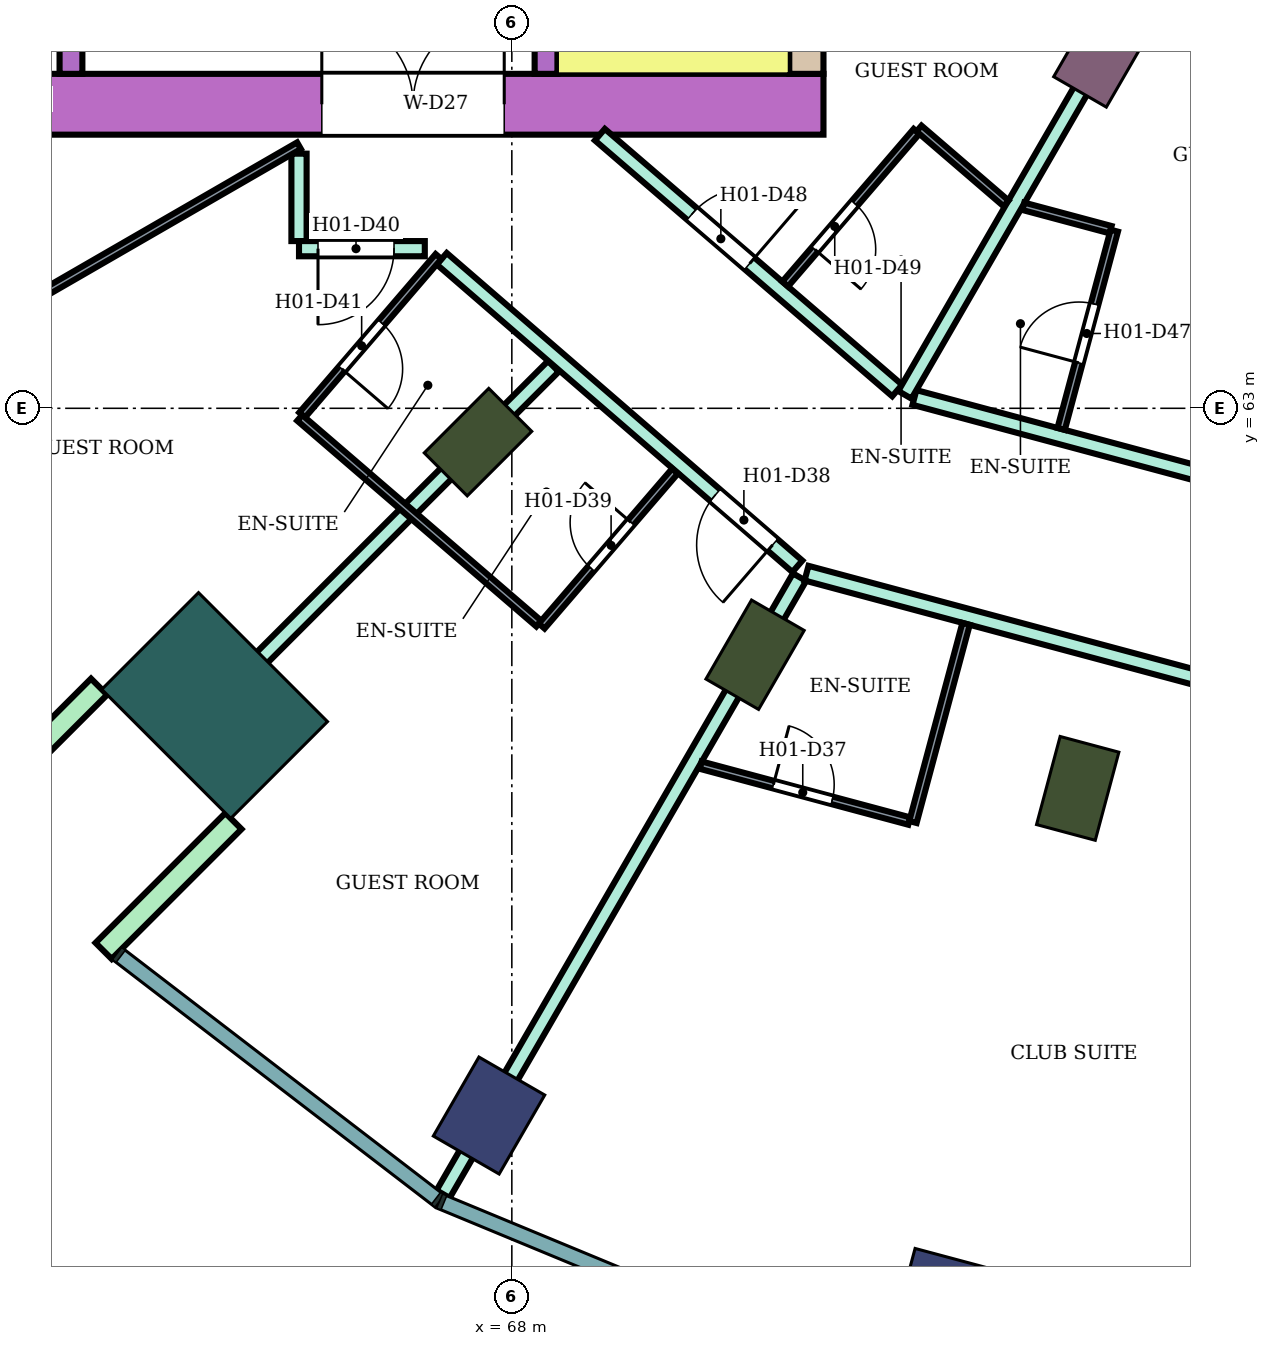
"""IFC4 building model, lengths in metres.
Left out: names, types, materials, properties, quantities, classifications, styles, units other than length and angle.
Written with IfcOpenShell. Run it as: python <this file> out.ifc"""

import sys

from ifc_helpers import new_model, si_unit, direction, frame, frame_2d, origin, origin_2d, place, context, subcontext, project, spatial, rectangle, extrude, element, fill, save


model = new_model("IFC4")
c1 = context("Model", 3, precision=1e-05, world=origin(), true_north=direction((0.0, 1.0)))
c2 = subcontext(c1, "Body", "Model", "MODEL_VIEW")
j1 = project(units=[si_unit("LENGTHUNIT", "METRE"), si_unit("PLANEANGLEUNIT", "RADIAN")], contexts=[c1])
p1 = place(None, origin())
s1 = spatial("IfcSite", under=j1, at=p1, CompositionType="ELEMENT")
p2 = place(p1, origin())
s2 = spatial("IfcBuilding", under=s1, at=p2, CompositionType="ELEMENT")
p3 = place(p2, frame((0.0, 0.0, 36.4)))
s3 = spatial("IfcBuildingStorey", under=s2, at=p3, CompositionType="ELEMENT", Elevation=36.4)
for number, where, z_axis, x_axis in (
    (1, (67.7, 53.696, 0.0), (0.0, 0.0, 1.0), (-0.5, -0.866, 0.0)),
    (2, (73.633, 51.238, 0.0), (0.0, 0.0, 1.0), (-0.259, -0.966, 0.0)),
):
    element("IfcColumn", number, at=place(p3, frame(where, z_axis=z_axis, x_axis=x_axis)), inside=s3, PredefinedType="COLUMN", context=c2, shape_type="SweptSolid", body=[
        extrude(rectangle(XDim=1.2, YDim=1.0, at=origin_2d()), origin(), (0.0, 0.0, 1.0), 3.8),
    ])
for number, where, z_axis, x_axis in (
    (3, (67.555, 62.555, 0.0), (0.0, 0.0, 1.0), (-0.707, -0.707, 0.0)),
    (4, (71.2, 59.758, 0.0), (0.0, 0.0, 1.0), (-0.5, -0.866, 0.0)),
    (5, (75.445, 58.0, 0.0), (0.0, 0.0, 1.0), (-0.259, -0.966, 0.0)),
):
    element("IfcColumn", number, at=place(p3, frame(where, z_axis=z_axis, x_axis=x_axis)), inside=s3, PredefinedType="COLUMN", context=c2, shape_type="SweptSolid", body=[
        extrude(rectangle(XDim=1.2, YDim=0.8, at=origin_2d()), origin(), (0.0, 0.0, 1.0), 3.8),
    ])
p4 = place(p3, frame((75.7, 67.552, 0.0), z_axis=(0.0, 0.0, 1.0), x_axis=(-0.5, -0.866025403784, 0.0)))
e6 = element("IfcColumn", 6, at=p4, inside=s3, PredefinedType="COLUMN", context=c2, shape_type="SweptSolid", body=[
    extrude(rectangle(XDim=0.9, YDim=0.8, at=origin_2d()), origin(), (0.0, 0.0, 1.0), 3.8),
])
p5 = place(p3, frame((64.09, 59.09, 0.0), z_axis=(0.0, 0.0, 1.0), x_axis=(-0.707106781187, -0.707106781187, 0.0)))
e7 = element("IfcColumn", 7, at=p5, inside=s3, PredefinedType="COLUMN", context=c2, shape_type="SweptSolid", body=[
    extrude(rectangle(XDim=1.8, YDim=2.4, at=origin_2d()), origin(), (0.0, 0.0, 1.0), 3.8),
])
p6 = place(p3, frame((72.1, 67.0, 0.0), z_axis=(0.0, 0.0, 1.0), x_axis=(-1.0, 0.0, 0.0)))
e8 = element("IfcWall", 8, at=p6, inside=s3, PredefinedType="SHEAR", context=c2, shape_type="SweptSolid", body=[
    extrude(rectangle(XDim=14.7, YDim=0.8, at=frame_2d((7.35, 0.0))), origin(), (0.0, 0.0, 1.0), 3.48),
])
p7 = place(p6, frame((4.2, 0.0, 0.0)))
e9 = element("IfcOpeningElement", 9, at=p7, cuts=e8, PredefinedType="OPENING", context=c2, shape_type="SweptSolid", body=[
    extrude(rectangle(XDim=2.4, YDim=2.4, at=frame_2d((1.2, 1.2))), frame((0.0, 0.41, 0.0), z_axis=(0.0, -1.0, 0.0), x_axis=(1.0, 0.0, 0.0)), (0.0, 0.0, 1.0), 0.82),
])
p8 = place(p3, frame((71.875, 75.0, 0.0), z_axis=(0.0, 0.0, 1.0), x_axis=(0.0, -1.0, 0.0)))
e10 = element("IfcWall", 10, at=p8, inside=s3, PredefinedType="SHEAR", context=c2, shape_type="SweptSolid", body=[
    extrude(rectangle(XDim=7.6, YDim=0.45, at=frame_2d((3.8, 0.0))), origin(), (0.0, 0.0, 1.0), 3.48),
])
p9 = place(p3, frame((68.45, 75.0, 0.0), z_axis=(0.0, 0.0, 1.0), x_axis=(0.0, -1.0, 0.0)))
e11 = element("IfcWall", 11, at=p9, inside=s3, PredefinedType="SHEAR", context=c2, shape_type="SweptSolid", body=[
    extrude(rectangle(XDim=7.6, YDim=0.3, at=frame_2d((3.8, 0.0))), origin(), (0.0, 0.0, 1.0), 3.48),
])
p10 = place(p9, frame((1.85, 0.0, 0.0)))
e12 = element("IfcOpeningElement", 12, at=p10, cuts=e11, PredefinedType="OPENING", context=c2, shape_type="SweptSolid", body=[
    extrude(rectangle(XDim=0.9, YDim=2.1, at=frame_2d((0.45, 1.05))), frame((0.0, 0.16, 0.0), z_axis=(0.0, -1.0, 0.0), x_axis=(1.0, 0.0, 0.0)), (0.0, 0.0, 1.0), 0.32),
])
p11 = place(p3, frame((62.2, 71.4, 0.0), z_axis=(0.0, 0.0, 1.0), x_axis=(0.0, -1.0, 0.0)))
e13 = element("IfcWall", 13, at=p11, inside=s3, PredefinedType="SHEAR", context=c2, shape_type="SweptSolid", body=[
    extrude(rectangle(XDim=4.0, YDim=0.3, at=frame_2d((2.0, 0.0))), origin(), (0.0, 0.0, 1.0), 3.48),
])
for number, where, z_axis, x_axis in (
    (14, (62.57, 59.338, 0.0), (0.0, 0.0, 1.0), (-0.707, -0.707, 0.0)),
    (15, (64.338, 57.57, 0.0), (0.0, 0.0, 1.0), (-0.707, -0.707, 0.0)),
):
    element("IfcWall", number, at=place(p3, frame(where, z_axis=z_axis, x_axis=x_axis)), inside=s3, PredefinedType="NOTDEFINED", context=c2, shape_type="SweptSolid", body=[
        extrude(rectangle(XDim=2.416, YDim=0.3, at=frame_2d((1.208, 0.0))), origin(), (0.0, 0.0, 1.0), 3.8),
    ])
p12 = place(p3, frame((76.198, 68.415, 0.0), z_axis=(0.0, 0.0, 1.0), x_axis=(0.965933654434, -0.258789828301, 0.0)))
e16 = element("IfcWall", 16, at=p12, inside=s3, PredefinedType="NOTDEFINED", context=c2, shape_type="SweptSolid", body=[
    extrude(rectangle(XDim=3.936, YDim=0.2, at=frame_2d((1.968, 0.0))), origin(), (0.0, 0.0, 1.0), 3.8),
])
p13 = place(p12, frame((0.468, 0.0, 0.9)))
e17 = element("IfcOpeningElement", 17, at=p13, cuts=e16, PredefinedType="OPENING", context=c2, shape_type="SweptSolid", body=[
    extrude(rectangle(XDim=3.0, YDim=2.3, at=frame_2d((1.5, 1.15))), frame((0.0, 0.11, 0.0), z_axis=(0.0, -1.0, 0.0), x_axis=(1.0, 0.0, 0.0)), (0.0, 0.0, 1.0), 0.22),
])
p14 = place(p3, frame((63.592, 58.599, 0.0), z_axis=(0.0, 0.0, 1.0), x_axis=(0.707228748718, 0.706984792613, 0.0)))
e18 = element("IfcWall", 18, at=p14, inside=s3, PredefinedType="PARTITIONING", context=c2, shape_type="SweptSolid", body=[
    extrude(rectangle(XDim=7.005, YDim=0.2, at=frame_2d((3.503, 0.0))), origin(), (0.0, 0.0, 1.0), 3.35),
])
p15 = place(p3, frame((65.2, 65.2, 0.0), z_axis=(0.0, 0.0, 1.0), x_axis=(0.0, 1.0, 0.0)))
e19 = element("IfcWall", 19, at=p15, inside=s3, PredefinedType="PARTITIONING", context=c2, shape_type="SweptSolid", body=[
    extrude(rectangle(XDim=1.15, YDim=0.2, at=frame_2d((0.575, 0.0))), origin(), (0.0, 0.0, 1.0), 3.35),
])
p16 = place(p3, frame((65.2, 65.1, 0.0), z_axis=(0.0, 0.0, 1.0), x_axis=(1.0, 0.0, 0.0)))
e20 = element("IfcWall", 20, at=p16, inside=s3, PredefinedType="PARTITIONING", context=c2, shape_type="SweptSolid", body=[
    extrude(rectangle(XDim=1.655, YDim=0.2, at=frame_2d((0.828, 0.0))), origin(), (0.0, 0.0, 1.0), 3.35),
])
p17 = place(p16, frame((0.25, 0.0, 0.0)))
e21 = element("IfcOpeningElement", 21, at=p17, cuts=e20, PredefinedType="OPENING", context=c2, shape_type="SweptSolid", body=[
    extrude(rectangle(XDim=1.0, YDim=2.1, at=frame_2d((0.5, 1.05))), frame((0.0, 0.11, 0.0), z_axis=(0.0, -1.0, 0.0), x_axis=(1.0, 0.0, 0.0)), (0.0, 0.0, 1.0), 0.22),
])
p18 = place(p3, frame((67.078, 64.968, 0.0), z_axis=(0.0, 0.0, 1.0), x_axis=(0.756371089567, -0.654142778656, 0.0)))
e22 = element("IfcWall", 22, at=p18, inside=s3, PredefinedType="PARTITIONING", context=c2, shape_type="SweptSolid", body=[
    extrude(rectangle(XDim=6.185, YDim=0.2, at=frame_2d((3.093, 0.0))), origin(), (0.0, 0.0, 1.0), 3.35),
])
p19 = place(p18, frame((4.755, 0.0, 0.0)))
e23 = element("IfcOpeningElement", 23, at=p19, cuts=e22, PredefinedType="OPENING", context=c2, shape_type="SweptSolid", body=[
    extrude(rectangle(XDim=1.0, YDim=2.1, at=frame_2d((0.5, 1.05))), frame((0.0, 0.11, 0.0), z_axis=(0.0, -1.0, 0.0), x_axis=(1.0, 0.0, 0.0)), (0.0, 0.0, 1.0), 0.22),
])
p20 = place(p3, frame((67.096, 52.662, 0.0), z_axis=(0.0, 0.0, 1.0), x_axis=(0.500242450002, 0.865885379953, 0.0)))
e24 = element("IfcWall", 24, at=p20, inside=s3, PredefinedType="PARTITIONING", context=c2, shape_type="SweptSolid", body=[
    extrude(rectangle(XDim=9.374, YDim=0.2, at=frame_2d((4.687, 0.0))), origin(), (0.0, 0.0, 1.0), 3.35),
])
p21 = place(p3, frame((69.158, 66.6, 0.0), z_axis=(0.0, 0.0, 1.0), x_axis=(0.757976058094, -0.652282373943, 0.0)))
e25 = element("IfcWall", 25, at=p21, inside=s3, PredefinedType="PARTITIONING", context=c2, shape_type="SweptSolid", body=[
    extrude(rectangle(XDim=5.16, YDim=0.2, at=frame_2d((2.58, 0.0))), origin(), (0.0, 0.0, 1.0), 3.35),
])
p22 = place(p21, frame((1.6, 0.0, 0.0)))
e26 = element("IfcOpeningElement", 26, at=p22, cuts=e25, PredefinedType="OPENING", context=c2, shape_type="SweptSolid", body=[
    extrude(rectangle(XDim=1.0, YDim=2.1, at=frame_2d((0.5, 1.05))), frame((0.0, 0.11, 0.0), z_axis=(0.0, -1.0, 0.0), x_axis=(1.0, 0.0, 0.0)), (0.0, 0.0, 1.0), 0.22),
])
p23 = place(p3, frame((71.877, 60.831, 0.0), z_axis=(0.0, 0.0, 1.0), x_axis=(0.965852509869, -0.259092510851, 0.0)))
e27 = element("IfcWall", 27, at=p23, inside=s3, PredefinedType="PARTITIONING", context=c2, shape_type="SweptSolid", body=[
    extrude(rectangle(XDim=8.32, YDim=0.2, at=frame_2d((4.16, 0.0))), origin(), (0.0, 0.0, 1.0), 3.35),
])
p24 = place(p23, frame((6.86, 0.0, 0.0)))
e28 = element("IfcOpeningElement", 28, at=p24, cuts=e27, PredefinedType="OPENING", context=c2, shape_type="SweptSolid", body=[
    extrude(rectangle(XDim=1.0, YDim=2.1, at=frame_2d((0.5, 1.05))), frame((0.0, 0.11, 0.0), z_axis=(0.0, -1.0, 0.0), x_axis=(1.0, 0.0, 0.0)), (0.0, 0.0, 1.0), 0.22),
])
p25 = place(p3, frame((73.297, 63.143, 0.0), z_axis=(0.0, 0.0, 1.0), x_axis=(0.965859030528, -0.25906820173, 0.0)))
e29 = element("IfcWall", 29, at=p25, inside=s3, PredefinedType="PARTITIONING", context=c2, shape_type="SweptSolid", body=[
    extrude(rectangle(XDim=6.81, YDim=0.2, at=frame_2d((3.405, 0.0))), origin(), (0.0, 0.0, 1.0), 3.35),
])
p26 = place(p25, frame((5.39, 0.0, 0.0)))
e30 = element("IfcOpeningElement", 30, at=p26, cuts=e29, PredefinedType="OPENING", context=c2, shape_type="SweptSolid", body=[
    extrude(rectangle(XDim=1.0, YDim=2.1, at=frame_2d((0.5, 1.05))), frame((0.0, 0.11, 0.0), z_axis=(0.0, -1.0, 0.0), x_axis=(1.0, 0.0, 0.0)), (0.0, 0.0, 1.0), 0.22),
])
p27 = place(p3, frame((73.171, 63.177, 0.0), z_axis=(0.0, 0.0, 1.0), x_axis=(0.500257106344, 0.865876912472, 0.0)))
e31 = element("IfcWall", 31, at=p27, inside=s3, PredefinedType="PARTITIONING", context=c2, shape_type="SweptSolid", body=[
    extrude(rectangle(XDim=5.955, YDim=0.2, at=frame_2d((2.978, 0.0))), origin(), (0.0, 0.0, 1.0), 3.35),
])
p28 = place(p3, frame((57.659, 62.101, 0.0), z_axis=(0.0, 0.0, 1.0), x_axis=(0.86602264145, 0.500004784474, 0.0)))
e32 = element("IfcWall", 32, at=p28, inside=s3, PredefinedType="PARTITIONING", context=c2, shape_type="SweptSolid", body=[
    extrude(rectangle(XDim=8.708, YDim=0.1, at=frame_2d((4.354, 0.0))), origin(), (0.0, 0.0, 1.0), 3.35),
])
p29 = place(p28, frame((3.929, 0.0, 0.0)))
e33 = element("IfcOpeningElement", 33, at=p29, cuts=e32, PredefinedType="OPENING", context=c2, shape_type="SweptSolid", body=[
    extrude(rectangle(XDim=0.9, YDim=2.1, at=frame_2d((0.45, 1.05))), frame((0.0, 0.06, 0.0), z_axis=(0.0, -1.0, 0.0), x_axis=(1.0, 0.0, 0.0)), (0.0, 0.0, 1.0), 0.12),
])
p30 = place(p3, frame((65.242, 62.912, 0.0), z_axis=(0.0, 0.0, 1.0), x_axis=(0.652069888227, 0.758158862553, 0.0)))
e34 = element("IfcWall", 34, at=p30, inside=s3, PredefinedType="PARTITIONING", context=c2, shape_type="SweptSolid", body=[
    extrude(rectangle(XDim=2.75, YDim=0.1, at=frame_2d((1.375, 0.0))), origin(), (0.0, 0.0, 1.0), 3.35),
])
p31 = place(p30, frame((0.8, 0.0, 0.0)))
e35 = element("IfcOpeningElement", 35, at=p31, cuts=e34, PredefinedType="OPENING", context=c2, shape_type="SweptSolid", body=[
    extrude(rectangle(XDim=0.8, YDim=2.1, at=frame_2d((0.4, 1.05))), frame((0.0, 0.06, 0.0), z_axis=(0.0, -1.0, 0.0), x_axis=(1.0, 0.0, 0.0)), (0.0, 0.0, 1.0), 0.12),
])
p32 = place(p3, frame((65.209, 62.875, 0.0), z_axis=(0.0, 0.0, 1.0), x_axis=(0.757930378138, -0.652335451969, 0.0)))
e36 = element("IfcWall", 36, at=p32, inside=s3, PredefinedType="PARTITIONING", context=c2, shape_type="SweptSolid", body=[
    extrude(rectangle(XDim=4.15, YDim=0.1, at=frame_2d((2.075, 0.0))), origin(), (0.0, 0.0, 1.0), 3.35),
])
p33 = place(p3, frame((68.393, 60.135, 0.0), z_axis=(0.0, 0.0, 1.0), x_axis=(0.652061182569, 0.758166349944, 0.0)))
e37 = element("IfcWall", 37, at=p33, inside=s3, PredefinedType="PARTITIONING", context=c2, shape_type="SweptSolid", body=[
    extrude(rectangle(XDim=2.69, YDim=0.1, at=frame_2d((1.345, 0.0))), origin(), (0.0, 0.0, 1.0), 3.35),
])
p34 = place(p33, frame((1.0, 0.0, 0.0)))
e38 = element("IfcOpeningElement", 38, at=p34, cuts=e37, PredefinedType="OPENING", context=c2, shape_type="SweptSolid", body=[
    extrude(rectangle(XDim=0.8, YDim=2.1, at=frame_2d((0.4, 1.05))), frame((0.0, 0.06, 0.0), z_axis=(0.0, -1.0, 0.0), x_axis=(1.0, 0.0, 0.0)), (0.0, 0.0, 1.0), 0.12),
])
p35 = place(p3, frame((70.484, 58.305, 0.0), z_axis=(0.0, 0.0, 1.0), x_axis=(0.965904703781, -0.258897862512, 0.0)))
e39 = element("IfcWall", 39, at=p35, inside=s3, PredefinedType="PARTITIONING", context=c2, shape_type="SweptSolid", body=[
    extrude(rectangle(XDim=2.841, YDim=0.1, at=frame_2d((1.421, 0.0))), origin(), (0.0, 0.0, 1.0), 3.35),
])
p36 = place(p35, frame((0.99, 0.0, 0.0)))
e40 = element("IfcOpeningElement", 40, at=p36, cuts=e39, PredefinedType="OPENING", context=c2, shape_type="SweptSolid", body=[
    extrude(rectangle(XDim=0.8, YDim=2.1, at=frame_2d((0.4, 1.05))), frame((0.0, 0.06, 0.0), z_axis=(0.0, -1.0, 0.0), x_axis=(1.0, 0.0, 0.0)), (0.0, 0.0, 1.0), 0.12),
])
p37 = place(p3, frame((71.596, 64.635, 0.0), z_axis=(0.0, 0.0, 1.0), x_axis=(0.652285007511, 0.757973791748, 0.0)))
e41 = element("IfcWall", 41, at=p37, inside=s3, PredefinedType="PARTITIONING", context=c2, shape_type="SweptSolid", body=[
    extrude(rectangle(XDim=2.65, YDim=0.1, at=frame_2d((1.325, 0.0))), origin(), (0.0, 0.0, 1.0), 3.35),
])
p38 = place(p37, frame((0.6, 0.0, 0.0)))
e42 = element("IfcOpeningElement", 42, at=p38, cuts=e41, PredefinedType="OPENING", context=c2, shape_type="SweptSolid", body=[
    extrude(rectangle(XDim=0.8, YDim=2.1, at=frame_2d((0.4, 1.05))), frame((0.0, 0.06, 0.0), z_axis=(0.0, -1.0, 0.0), x_axis=(1.0, 0.0, 0.0)), (0.0, 0.0, 1.0), 0.12),
])
p39 = place(p3, frame((73.277, 57.557, 0.0), z_axis=(0.0, 0.0, 1.0), x_axis=(0.258928960762, 0.965896367774, 0.0)))
e43 = element("IfcWall", 43, at=p39, inside=s3, PredefinedType="PARTITIONING", context=c2, shape_type="SweptSolid", body=[
    extrude(rectangle(XDim=2.699, YDim=0.1, at=frame_2d((1.35, 0.0))), origin(), (0.0, 0.0, 1.0), 3.35),
])
p40 = place(p3, frame((73.357, 66.681, 0.0), z_axis=(0.0, 0.0, 1.0), x_axis=(0.758263469747, -0.651948242154, 0.0)))
e44 = element("IfcWall", 44, at=p40, inside=s3, PredefinedType="PARTITIONING", context=c2, shape_type="SweptSolid", body=[
    extrude(rectangle(XDim=1.511, YDim=0.1, at=frame_2d((0.755, 0.0))), origin(), (0.0, 0.0, 1.0), 3.35),
])
p41 = place(p3, frame((74.729, 65.657, 0.0), z_axis=(0.0, 0.0, 1.0), x_axis=(0.965948051503, -0.258736085224, 0.0)))
e45 = element("IfcWall", 45, at=p41, inside=s3, PredefinedType="PARTITIONING", context=c2, shape_type="SweptSolid", body=[
    extrude(rectangle(XDim=1.189, YDim=0.1, at=frame_2d((0.594, 0.0))), origin(), (0.0, 0.0, 1.0), 3.35),
])
p42 = place(p3, frame((75.227, 62.729, 0.0), z_axis=(0.0, 0.0, 1.0), x_axis=(0.258945475746, 0.965891940432, 0.0)))
e46 = element("IfcWall", 46, at=p42, inside=s3, PredefinedType="PARTITIONING", context=c2, shape_type="SweptSolid", body=[
    extrude(rectangle(XDim=2.7, YDim=0.1, at=frame_2d((1.35, 0.0))), origin(), (0.0, 0.0, 1.0), 3.35),
])
p43 = place(p42, frame((0.9, 0.0, 0.0)))
e47 = element("IfcOpeningElement", 47, at=p43, cuts=e46, PredefinedType="OPENING", context=c2, shape_type="SweptSolid", body=[
    extrude(rectangle(XDim=0.8, YDim=2.1, at=frame_2d((0.4, 1.05))), frame((0.0, 0.06, 0.0), z_axis=(0.0, -1.0, 0.0), x_axis=(1.0, 0.0, 0.0)), (0.0, 0.0, 1.0), 0.12),
])
p44 = place(p13, origin())
e48 = element("IfcWindow", 48, at=p44, inside=s3, PartitioningType="SINGLE_PANEL", PredefinedType="WINDOW", context=c2, shape_type="SweptSolid", body=[
    extrude(rectangle(XDim=3.0, YDim=2.3, at=frame_2d((1.5, 1.15))), frame((0.0, 0.03, 0.0), z_axis=(0.0, -1.0, 0.0), x_axis=(1.0, 0.0, 0.0)), (0.0, 0.0, 1.0), 0.06),
])
fill(e17, e48)
p45 = place(p36, origin())
e49 = element("IfcDoor", 49, at=p45, inside=s3, OperationType="SINGLE_SWING_LEFT", PredefinedType="DOOR", context=c2, shape_type="SweptSolid", body=[
    extrude(rectangle(XDim=0.8, YDim=2.1, at=frame_2d((0.4, 1.05))), frame((0.0, 0.025, 0.0), z_axis=(0.0, -1.0, 0.0), x_axis=(1.0, 0.0, 0.0)), (0.0, 0.0, 1.0), 0.05),
])
fill(e40, e49)
p46 = place(p19, frame((1.0, 0.0, 0.0), z_axis=(0.0, 0.0, 1.0), x_axis=(-1.0, 0.0, 0.0)))
e50 = element("IfcDoor", 50, at=p46, inside=s3, OperationType="SINGLE_SWING_LEFT", PredefinedType="DOOR", context=c2, shape_type="SweptSolid", body=[
    extrude(rectangle(XDim=1.0, YDim=2.1, at=frame_2d((0.5, 1.05))), frame((0.0, 0.025, 0.0), z_axis=(0.0, -1.0, 0.0), x_axis=(1.0, 0.0, 0.0)), (0.0, 0.0, 1.0), 0.05),
])
fill(e23, e50)
p47 = place(p34, origin())
e51 = element("IfcDoor", 51, at=p47, inside=s3, OperationType="SINGLE_SWING_RIGHT", PredefinedType="DOOR", context=c2, shape_type="SweptSolid", body=[
    extrude(rectangle(XDim=0.8, YDim=2.1, at=frame_2d((0.4, 1.05))), frame((0.0, 0.025, 0.0), z_axis=(0.0, -1.0, 0.0), x_axis=(1.0, 0.0, 0.0)), (0.0, 0.0, 1.0), 0.05),
])
fill(e38, e51)
p48 = place(p17, frame((1.0, 0.0, 0.0), z_axis=(0.0, 0.0, 1.0), x_axis=(-1.0, 0.0, 0.0)))
e52 = element("IfcDoor", 52, at=p48, inside=s3, OperationType="SINGLE_SWING_RIGHT", PredefinedType="DOOR", context=c2, shape_type="SweptSolid", body=[
    extrude(rectangle(XDim=1.0, YDim=2.1, at=frame_2d((0.5, 1.05))), frame((0.0, 0.025, 0.0), z_axis=(0.0, -1.0, 0.0), x_axis=(1.0, 0.0, 0.0)), (0.0, 0.0, 1.0), 0.05),
])
fill(e21, e52)
p49 = place(p31, frame((0.8, 0.0, 0.0), z_axis=(0.0, 0.0, 1.0), x_axis=(-1.0, 0.0, 0.0)))
e53 = element("IfcDoor", 53, at=p49, inside=s3, OperationType="SINGLE_SWING_RIGHT", PredefinedType="DOOR", context=c2, shape_type="SweptSolid", body=[
    extrude(rectangle(XDim=0.8, YDim=2.1, at=frame_2d((0.4, 1.05))), frame((0.0, 0.025, 0.0), z_axis=(0.0, -1.0, 0.0), x_axis=(1.0, 0.0, 0.0)), (0.0, 0.0, 1.0), 0.05),
])
fill(e35, e53)
p50 = place(p43, origin())
e54 = element("IfcDoor", 54, at=p50, inside=s3, OperationType="SINGLE_SWING_LEFT", PredefinedType="DOOR", context=c2, shape_type="SweptSolid", body=[
    extrude(rectangle(XDim=0.8, YDim=2.1, at=frame_2d((0.4, 1.05))), frame((0.0, 0.025, 0.0), z_axis=(0.0, -1.0, 0.0), x_axis=(1.0, 0.0, 0.0)), (0.0, 0.0, 1.0), 0.05),
])
fill(e47, e54)
p51 = place(p22, origin())
e55 = element("IfcDoor", 55, at=p51, inside=s3, OperationType="SINGLE_SWING_RIGHT", PredefinedType="DOOR", context=c2, shape_type="SweptSolid", body=[
    extrude(rectangle(XDim=1.0, YDim=2.1, at=frame_2d((0.5, 1.05))), frame((0.0, 0.025, 0.0), z_axis=(0.0, -1.0, 0.0), x_axis=(1.0, 0.0, 0.0)), (0.0, 0.0, 1.0), 0.05),
])
fill(e26, e55)
p52 = place(p38, frame((0.8, 0.0, 0.0), z_axis=(0.0, 0.0, 1.0), x_axis=(-1.0, 0.0, 0.0)))
e56 = element("IfcDoor", 56, at=p52, inside=s3, OperationType="SINGLE_SWING_RIGHT", PredefinedType="DOOR", context=c2, shape_type="SweptSolid", body=[
    extrude(rectangle(XDim=0.8, YDim=2.1, at=frame_2d((0.4, 1.05))), frame((0.0, 0.025, 0.0), z_axis=(0.0, -1.0, 0.0), x_axis=(1.0, 0.0, 0.0)), (0.0, 0.0, 1.0), 0.05),
])
fill(e42, e56)
p53 = place(p7, frame((2.4, 0.0, 0.0), z_axis=(0.0, 0.0, 1.0), x_axis=(-1.0, 0.0, 0.0)))
e57 = element("IfcDoor", 57, at=p53, inside=s3, OperationType="DOUBLE_DOOR_SINGLE_SWING", PredefinedType="DOOR", context=c2, shape_type="SweptSolid", body=[
    extrude(rectangle(XDim=2.4, YDim=2.4, at=frame_2d((1.2, 1.2))), frame((0.0, 0.025, 0.0), z_axis=(0.0, -1.0, 0.0), x_axis=(1.0, 0.0, 0.0)), (0.0, 0.0, 1.0), 0.05),
])
fill(e9, e57)
save(model, sys.argv[1])
